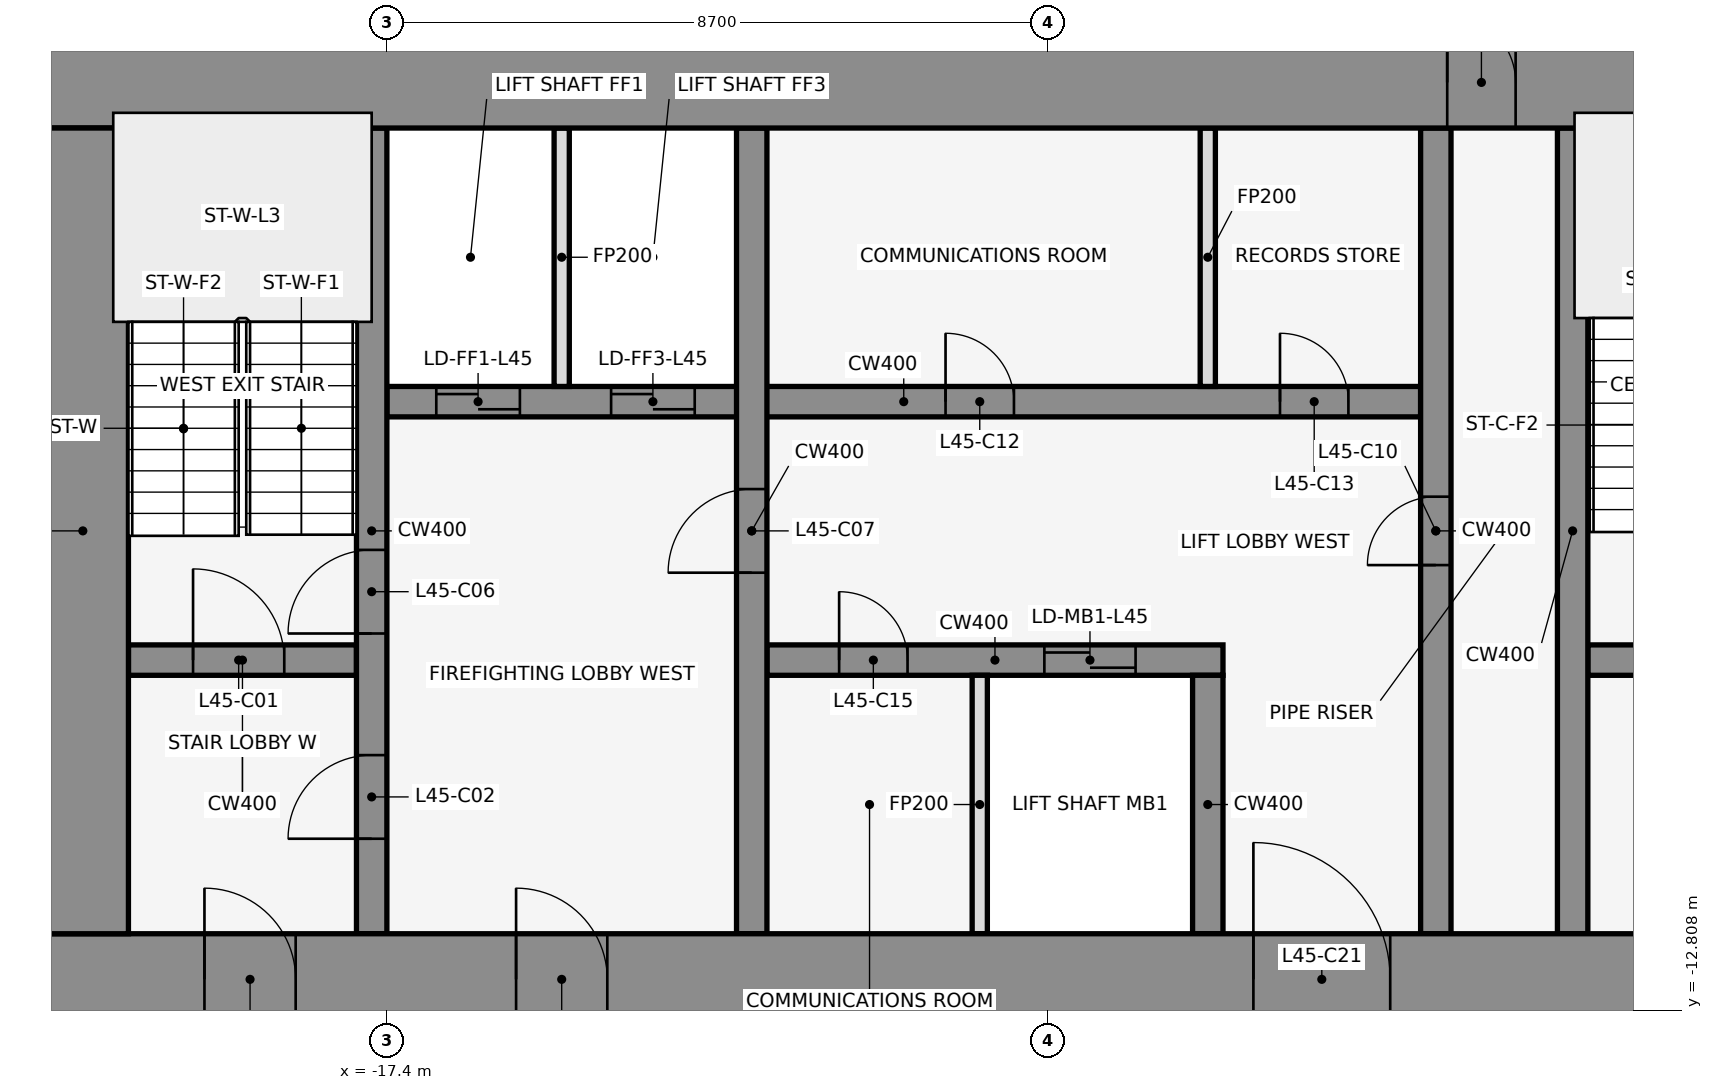
"""IFC4 building model, lengths in metres.
Left out: names, types, materials, properties, quantities, classifications, styles, units other than length and angle.
Written with IfcOpenShell. Run it as: python <this file> out.ifc"""

import sys

from ifc_helpers import new_model, si_unit, direction, frame, frame_2d, origin, place, context, subcontext, project, spatial, rectangle, extrude, element, fill, save


model = new_model("IFC4")
c1 = context("Model", 3, precision=1e-05, world=origin(), true_north=direction((0.0, 1.0)))
c2 = subcontext(c1, "Body", "Model", "MODEL_VIEW")
j1 = project(units=[si_unit("LENGTHUNIT", "METRE"), si_unit("PLANEANGLEUNIT", "RADIAN")], contexts=[c1])
p1 = place(None, origin())
s1 = spatial("IfcSite", under=j1, at=p1, CompositionType="ELEMENT")
p2 = place(p1, origin())
s2 = spatial("IfcBuilding", under=s1, at=p2, CompositionType="ELEMENT")
p3 = place(p2, frame((0.0, 0.0, 203.2)))
s3 = spatial("IfcBuildingStorey", under=s2, at=p3, CompositionType="ELEMENT", Elevation=203.2)
for number, where, z_axis, x_axis in (
    (1, (-0.068, -0.105, 0.0), (0.0, 0.0, 1.0), (-0.84, 0.543, 0.0)),
    (2, (-14.599, 1.08, 0.0), (0.0, 0.0, 1.0), (-0.84, -0.543, 0.0)),
):
    element("IfcWall", number, at=place(p3, frame(where, z_axis=z_axis, x_axis=x_axis)), inside=s3, PredefinedType="STANDARD", context=c2, shape_type="SweptSolid", body=[
        extrude(rectangle(XDim=2.183, YDim=0.25, at=frame_2d((1.091, 0.0))), origin(), (0.0, 0.0, 1.0), 3.95),
    ])
p4 = place(p3, frame((-20.8, -8.2, 0.0), z_axis=(0.0, 0.0, 1.0), x_axis=(1.0, 0.0, 0.0)))
e3 = element("IfcWall", 3, at=p4, inside=s3, PredefinedType="SHEAR", context=c2, shape_type="SweptSolid", body=[
    extrude(rectangle(XDim=3.0, YDim=0.4, at=frame_2d((1.5, 0.0))), origin(), (0.0, 0.0, 1.0), 4.1),
])
p5 = place(p4, frame((0.85, 0.0, 0.0)))
e4 = element("IfcOpeningElement", 4, at=p5, cuts=e3, PredefinedType="OPENING", context=c2, shape_type="SweptSolid", body=[
    extrude(rectangle(XDim=1.2, YDim=2.1, at=frame_2d((0.6, 1.05))), frame((0.0, 0.212, 0.0), z_axis=(0.0, -1.0, 0.0), x_axis=(1.0, 0.0, 0.0)), (0.0, 0.0, 1.0), 0.424),
])
p6 = place(p3, frame((-12.4, -8.2, 0.0), z_axis=(0.0, 0.0, 1.0), x_axis=(1.0, 0.0, 0.0)))
e5 = element("IfcWall", 5, at=p6, inside=s3, PredefinedType="SHEAR", context=c2, shape_type="SweptSolid", body=[
    extrude(rectangle(XDim=6.0, YDim=0.4, at=frame_2d((3.0, 0.0))), origin(), (0.0, 0.0, 1.0), 4.1),
])
p7 = place(p6, frame((3.65, 0.0, 0.0)))
e6 = element("IfcOpeningElement", 6, at=p7, cuts=e5, PredefinedType="OPENING", context=c2, shape_type="SweptSolid", body=[
    extrude(rectangle(XDim=1.2, YDim=2.1, at=frame_2d((0.6, 1.05))), frame((0.0, 0.212, 0.0), z_axis=(0.0, -1.0, 0.0), x_axis=(1.0, 0.0, 0.0)), (0.0, 0.0, 1.0), 0.424),
])
p8 = place(p6, frame((0.95, 0.0, 0.0)))
e7 = element("IfcOpeningElement", 7, at=p8, cuts=e5, PredefinedType="OPENING", context=c2, shape_type="SweptSolid", body=[
    extrude(rectangle(XDim=0.9, YDim=2.1, at=frame_2d((0.45, 1.05))), frame((0.0, 0.212, 0.0), z_axis=(0.0, -1.0, 0.0), x_axis=(1.0, 0.0, 0.0)), (0.0, 0.0, 1.0), 0.424),
])
p9 = place(p3, frame((-1.6, -8.2, 0.0), z_axis=(0.0, 0.0, 1.0), x_axis=(1.0, 0.0, 0.0)))
e8 = element("IfcWall", 8, at=p9, inside=s3, PredefinedType="SHEAR", context=c2, shape_type="SweptSolid", body=[
    extrude(rectangle(XDim=3.2, YDim=0.4, at=frame_2d((1.6, 0.0))), origin(), (0.0, 0.0, 1.0), 4.1),
])
p10 = place(p9, frame((1.05, 0.0, 0.0)))
e9 = element("IfcOpeningElement", 9, at=p10, cuts=e8, PredefinedType="OPENING", context=c2, shape_type="SweptSolid", body=[
    extrude(rectangle(XDim=1.2, YDim=2.1, at=frame_2d((0.6, 1.05))), frame((0.0, 0.212, 0.0), z_axis=(0.0, -1.0, 0.0), x_axis=(1.0, 0.0, 0.0)), (0.0, 0.0, 1.0), 0.424),
])
p11 = place(p3, frame((-17.4, -4.8, 0.0), z_axis=(0.0, 0.0, 1.0), x_axis=(1.0, 0.0, 0.0)))
e10 = element("IfcWall", 10, at=p11, inside=s3, PredefinedType="SHEAR", context=c2, shape_type="SweptSolid", body=[
    extrude(rectangle(XDim=13.6, YDim=0.4, at=frame_2d((6.8, 0.0))), origin(), (0.0, 0.0, 1.0), 4.1),
])
p12 = place(p11, frame((0.65, 0.0, 0.0)))
e11 = element("IfcOpeningElement", 11, at=p12, cuts=e10, PredefinedType="OPENING", context=c2, shape_type="SweptSolid", body=[
    extrude(rectangle(XDim=1.1, YDim=2.1, at=frame_2d((0.55, 1.05))), frame((0.0, 0.212, 0.0), z_axis=(0.0, -1.0, 0.0), x_axis=(1.0, 0.0, 0.0)), (0.0, 0.0, 1.0), 0.424),
])
p13 = place(p11, frame((2.95, 0.0, 0.0)))
e12 = element("IfcOpeningElement", 12, at=p13, cuts=e10, PredefinedType="OPENING", context=c2, shape_type="SweptSolid", body=[
    extrude(rectangle(XDim=1.1, YDim=2.1, at=frame_2d((0.55, 1.05))), frame((0.0, 0.212, 0.0), z_axis=(0.0, -1.0, 0.0), x_axis=(1.0, 0.0, 0.0)), (0.0, 0.0, 1.0), 0.424),
])
p14 = place(p11, frame((7.35, 0.0, 0.0)))
e13 = element("IfcOpeningElement", 13, at=p14, cuts=e10, PredefinedType="OPENING", context=c2, shape_type="SweptSolid", body=[
    extrude(rectangle(XDim=0.9, YDim=2.1, at=frame_2d((0.45, 1.05))), frame((0.0, 0.212, 0.0), z_axis=(0.0, -1.0, 0.0), x_axis=(1.0, 0.0, 0.0)), (0.0, 0.0, 1.0), 0.424),
])
p15 = place(p11, frame((11.75, 0.0, 0.0)))
e14 = element("IfcOpeningElement", 14, at=p15, cuts=e10, PredefinedType="OPENING", context=c2, shape_type="SweptSolid", body=[
    extrude(rectangle(XDim=0.9, YDim=2.1, at=frame_2d((0.45, 1.05))), frame((0.0, 0.212, 0.0), z_axis=(0.0, -1.0, 0.0), x_axis=(1.0, 0.0, 0.0)), (0.0, 0.0, 1.0), 0.424),
])
p16 = place(p3, frame((-17.6, -11.8, 0.0), z_axis=(0.0, 0.0, 1.0), x_axis=(0.0, 1.0, 0.0)))
e15 = element("IfcWall", 15, at=p16, inside=s3, PredefinedType="SHEAR", context=c2, shape_type="SweptSolid", body=[
    extrude(rectangle(XDim=10.6, YDim=0.4, at=frame_2d((5.3, 0.0))), origin(), (0.0, 0.0, 1.0), 4.1),
])
p17 = place(p16, frame((1.25, 0.0, 0.0)))
e16 = element("IfcOpeningElement", 16, at=p17, cuts=e15, PredefinedType="OPENING", context=c2, shape_type="SweptSolid", body=[
    extrude(rectangle(XDim=1.1, YDim=2.1, at=frame_2d((0.55, 1.05))), frame((0.0, 0.212, 0.0), z_axis=(0.0, -1.0, 0.0), x_axis=(1.0, 0.0, 0.0)), (0.0, 0.0, 1.0), 0.424),
])
p18 = place(p16, frame((3.95, 0.0, 0.0)))
e17 = element("IfcOpeningElement", 17, at=p18, cuts=e15, PredefinedType="OPENING", context=c2, shape_type="SweptSolid", body=[
    extrude(rectangle(XDim=1.1, YDim=2.1, at=frame_2d((0.55, 1.05))), frame((0.0, 0.212, 0.0), z_axis=(0.0, -1.0, 0.0), x_axis=(1.0, 0.0, 0.0)), (0.0, 0.0, 1.0), 0.424),
])
p19 = place(p3, frame((-15.1, -4.6, 0.0), z_axis=(0.0, 0.0, 1.0), x_axis=(0.0, 1.0, 0.0)))
e18 = element("IfcWall", 18, at=p19, inside=s3, PredefinedType="PARTITIONING", context=c2, shape_type="SweptSolid", body=[
    extrude(rectangle(XDim=3.4, YDim=0.2, at=frame_2d((1.7, 0.0))), origin(), (0.0, 0.0, 1.0), 2.84),
])
p20 = place(p3, frame((-12.6, -11.8, 0.0), z_axis=(0.0, 0.0, 1.0), x_axis=(0.0, 1.0, 0.0)))
e19 = element("IfcWall", 19, at=p20, inside=s3, PredefinedType="SHEAR", context=c2, shape_type="SweptSolid", body=[
    extrude(rectangle(XDim=10.6, YDim=0.4, at=frame_2d((5.3, 0.0))), origin(), (0.0, 0.0, 1.0), 4.1),
])
p21 = place(p20, frame((4.75, 0.0, 0.0)))
e20 = element("IfcOpeningElement", 20, at=p21, cuts=e19, PredefinedType="OPENING", context=c2, shape_type="SweptSolid", body=[
    extrude(rectangle(XDim=1.1, YDim=2.1, at=frame_2d((0.55, 1.05))), frame((0.0, 0.212, 0.0), z_axis=(0.0, -1.0, 0.0), x_axis=(1.0, 0.0, 0.0)), (0.0, 0.0, 1.0), 0.424),
])
p22 = place(p3, frame((-9.6, -11.8, 0.0), z_axis=(0.0, 0.0, 1.0), x_axis=(0.0, 1.0, 0.0)))
e21 = element("IfcWall", 21, at=p22, inside=s3, PredefinedType="PARTITIONING", context=c2, shape_type="SweptSolid", body=[
    extrude(rectangle(XDim=3.4, YDim=0.2, at=frame_2d((1.7, 0.0))), origin(), (0.0, 0.0, 1.0), 2.84),
])
p23 = place(p3, frame((-6.6, -11.8, 0.0), z_axis=(0.0, 0.0, 1.0), x_axis=(0.0, 1.0, 0.0)))
e22 = element("IfcWall", 22, at=p23, inside=s3, PredefinedType="SHEAR", context=c2, shape_type="SweptSolid", body=[
    extrude(rectangle(XDim=3.4, YDim=0.4, at=frame_2d((1.7, 0.0))), origin(), (0.0, 0.0, 1.0), 4.1),
])
p24 = place(p3, frame((-6.6, -4.6, 0.0), z_axis=(0.0, 0.0, 1.0), x_axis=(0.0, 1.0, 0.0)))
e23 = element("IfcWall", 23, at=p24, inside=s3, PredefinedType="PARTITIONING", context=c2, shape_type="SweptSolid", body=[
    extrude(rectangle(XDim=3.4, YDim=0.2, at=frame_2d((1.7, 0.0))), origin(), (0.0, 0.0, 1.0), 2.84),
])
p25 = place(p3, frame((-3.6, -11.8, 0.0), z_axis=(0.0, 0.0, 1.0), x_axis=(0.0, 1.0, 0.0)))
e24 = element("IfcWall", 24, at=p25, inside=s3, PredefinedType="SHEAR", context=c2, shape_type="SweptSolid", body=[
    extrude(rectangle(XDim=10.6, YDim=0.4, at=frame_2d((5.3, 0.0))), origin(), (0.0, 0.0, 1.0), 4.1),
])
p26 = place(p25, frame((4.85, 0.0, 0.0)))
e25 = element("IfcOpeningElement", 25, at=p26, cuts=e24, PredefinedType="OPENING", context=c2, shape_type="SweptSolid", body=[
    extrude(rectangle(XDim=0.9, YDim=2.1, at=frame_2d((0.45, 1.05))), frame((0.0, 0.212, 0.0), z_axis=(0.0, -1.0, 0.0), x_axis=(1.0, 0.0, 0.0)), (0.0, 0.0, 1.0), 0.424),
])
p27 = place(p3, frame((-1.8, -11.8, 0.0), z_axis=(0.0, 0.0, 1.0), x_axis=(0.0, 1.0, 0.0)))
e26 = element("IfcWall", 26, at=p27, inside=s3, PredefinedType="SHEAR", context=c2, shape_type="SweptSolid", body=[
    extrude(rectangle(XDim=10.6, YDim=0.4, at=frame_2d((5.3, 0.0))), origin(), (0.0, 0.0, 1.0), 4.1),
])
p28 = place(p3, frame((-22.0, -0.6, 0.0), z_axis=(0.0, 0.0, 1.0), x_axis=(1.0, 0.0, 0.0)))
e27 = element("IfcWall", 27, at=p28, inside=s3, PredefinedType="SHEAR", context=c2, shape_type="SweptSolid", body=[
    extrude(rectangle(XDim=44.0, YDim=1.2, at=frame_2d((22.0, 0.0))), origin(), (0.0, 0.0, 1.0), 4.1),
])
p29 = place(p28, frame((18.55, 0.0, 0.0)))
e28 = element("IfcOpeningElement", 28, at=p29, cuts=e27, PredefinedType="OPENING", context=c2, shape_type="SweptSolid", body=[
    extrude(rectangle(XDim=0.9, YDim=2.1, at=frame_2d((0.45, 1.05))), frame((0.0, 0.612, 0.0), z_axis=(0.0, -1.0, 0.0), x_axis=(1.0, 0.0, 0.0)), (0.0, 0.0, 1.0), 1.224),
])
p30 = place(p28, frame((24.55, 0.0, 0.0)))
e29 = element("IfcOpeningElement", 29, at=p30, cuts=e27, PredefinedType="OPENING", context=c2, shape_type="SweptSolid", body=[
    extrude(rectangle(XDim=0.9, YDim=2.1, at=frame_2d((0.45, 1.05))), frame((0.0, 0.612, 0.0), z_axis=(0.0, -1.0, 0.0), x_axis=(1.0, 0.0, 0.0)), (0.0, 0.0, 1.0), 1.224),
])
p31 = place(p3, frame((-22.0, -12.4, 0.0), z_axis=(0.0, 0.0, 1.0), x_axis=(1.0, 0.0, 0.0)))
e30 = element("IfcWall", 30, at=p31, inside=s3, PredefinedType="SHEAR", context=c2, shape_type="SweptSolid", body=[
    extrude(rectangle(XDim=44.0, YDim=1.2, at=frame_2d((22.0, 0.0))), origin(), (0.0, 0.0, 1.0), 4.1),
])
p32 = place(p31, frame((2.2, 0.0, 0.0)))
e31 = element("IfcOpeningElement", 31, at=p32, cuts=e30, PredefinedType="OPENING", context=c2, shape_type="SweptSolid", body=[
    extrude(rectangle(XDim=1.2, YDim=2.1, at=frame_2d((0.6, 1.05))), frame((0.0, 0.612, 0.0), z_axis=(0.0, -1.0, 0.0), x_axis=(1.0, 0.0, 0.0)), (0.0, 0.0, 1.0), 1.224),
])
p33 = place(p31, frame((21.4, 0.0, 0.0)))
e32 = element("IfcOpeningElement", 32, at=p33, cuts=e30, PredefinedType="OPENING", context=c2, shape_type="SweptSolid", body=[
    extrude(rectangle(XDim=1.2, YDim=2.1, at=frame_2d((0.6, 1.05))), frame((0.0, 0.612, 0.0), z_axis=(0.0, -1.0, 0.0), x_axis=(1.0, 0.0, 0.0)), (0.0, 0.0, 1.0), 1.224),
])
p34 = place(p31, frame((40.6, 0.0, 0.0)))
e33 = element("IfcOpeningElement", 33, at=p34, cuts=e30, PredefinedType="OPENING", context=c2, shape_type="SweptSolid", body=[
    extrude(rectangle(XDim=1.2, YDim=2.1, at=frame_2d((0.6, 1.05))), frame((0.0, 0.612, 0.0), z_axis=(0.0, -1.0, 0.0), x_axis=(1.0, 0.0, 0.0)), (0.0, 0.0, 1.0), 1.224),
])
p35 = place(p31, frame((16.0, 0.0, 0.0)))
e34 = element("IfcOpeningElement", 34, at=p35, cuts=e30, PredefinedType="OPENING", context=c2, shape_type="SweptSolid", body=[
    extrude(rectangle(XDim=1.8, YDim=2.1, at=frame_2d((0.9, 1.05))), frame((0.0, 0.612, 0.0), z_axis=(0.0, -1.0, 0.0), x_axis=(1.0, 0.0, 0.0)), (0.0, 0.0, 1.0), 1.224),
])
p36 = place(p31, frame((6.3, 0.0, 0.0)))
e35 = element("IfcOpeningElement", 35, at=p36, cuts=e30, PredefinedType="OPENING", context=c2, shape_type="SweptSolid", body=[
    extrude(rectangle(XDim=1.2, YDim=2.1, at=frame_2d((0.6, 1.05))), frame((0.0, 0.612, 0.0), z_axis=(0.0, -1.0, 0.0), x_axis=(1.0, 0.0, 0.0)), (0.0, 0.0, 1.0), 1.224),
])
p37 = place(p31, frame((26.2, 0.0, 0.0)))
e36 = element("IfcOpeningElement", 36, at=p37, cuts=e30, PredefinedType="OPENING", context=c2, shape_type="SweptSolid", body=[
    extrude(rectangle(XDim=1.8, YDim=2.1, at=frame_2d((0.9, 1.05))), frame((0.0, 0.612, 0.0), z_axis=(0.0, -1.0, 0.0), x_axis=(1.0, 0.0, 0.0)), (0.0, 0.0, 1.0), 1.224),
])
p38 = place(p31, frame((36.5, 0.0, 0.0)))
e37 = element("IfcOpeningElement", 37, at=p38, cuts=e30, PredefinedType="OPENING", context=c2, shape_type="SweptSolid", body=[
    extrude(rectangle(XDim=1.2, YDim=2.1, at=frame_2d((0.6, 1.05))), frame((0.0, 0.612, 0.0), z_axis=(0.0, -1.0, 0.0), x_axis=(1.0, 0.0, 0.0)), (0.0, 0.0, 1.0), 1.224),
])
p39 = place(p3, frame((-21.4, -11.8, 0.0), z_axis=(0.0, 0.0, 1.0), x_axis=(0.0, 1.0, 0.0)))
e38 = element("IfcWall", 38, at=p39, inside=s3, PredefinedType="SHEAR", context=c2, shape_type="SweptSolid", body=[
    extrude(rectangle(XDim=10.6, YDim=1.2, at=frame_2d((5.3, 0.0))), origin(), (0.0, 0.0, 1.0), 4.1),
])
p40 = place(p5, origin())
e39 = element("IfcDoor", 39, at=p40, inside=s3, OperationType="SINGLE_SWING_LEFT", PredefinedType="DOOR", context=c2, shape_type="SweptSolid", body=[
    extrude(rectangle(XDim=1.2, YDim=2.1, at=frame_2d((0.6, 1.05))), frame((0.0, 0.025, 0.0), z_axis=(0.0, -1.0, 0.0), x_axis=(1.0, 0.0, 0.0)), (0.0, 0.0, 1.0), 0.05),
])
fill(e4, e39)
p41 = place(p17, frame((1.1, 0.0, 0.0), z_axis=(0.0, 0.0, 1.0), x_axis=(-1.0, 0.0, 0.0)))
e40 = element("IfcDoor", 40, at=p41, inside=s3, OperationType="SINGLE_SWING_LEFT", PredefinedType="DOOR", context=c2, shape_type="SweptSolid", body=[
    extrude(rectangle(XDim=1.1, YDim=2.1, at=frame_2d((0.55, 1.05))), frame((0.0, 0.025, 0.0), z_axis=(0.0, -1.0, 0.0), x_axis=(1.0, 0.0, 0.0)), (0.0, 0.0, 1.0), 0.05),
])
fill(e16, e40)
p42 = place(p12, origin())
e41 = element("IfcDoor", 41, at=p42, inside=s3, OperationType="DOUBLE_DOOR_SLIDING", PredefinedType="DOOR", context=c2, shape_type="SweptSolid", body=[
    extrude(rectangle(XDim=1.1, YDim=2.1, at=frame_2d((0.55, 1.05))), frame((0.0, 0.025, 0.0), z_axis=(0.0, -1.0, 0.0), x_axis=(1.0, 0.0, 0.0)), (0.0, 0.0, 1.0), 0.05),
])
fill(e11, e41)
p43 = place(p13, origin())
e42 = element("IfcDoor", 42, at=p43, inside=s3, OperationType="DOUBLE_DOOR_SLIDING", PredefinedType="DOOR", context=c2, shape_type="SweptSolid", body=[
    extrude(rectangle(XDim=1.1, YDim=2.1, at=frame_2d((0.55, 1.05))), frame((0.0, 0.025, 0.0), z_axis=(0.0, -1.0, 0.0), x_axis=(1.0, 0.0, 0.0)), (0.0, 0.0, 1.0), 0.05),
])
fill(e12, e42)
p44 = place(p7, origin())
e43 = element("IfcDoor", 43, at=p44, inside=s3, OperationType="DOUBLE_DOOR_SLIDING", PredefinedType="DOOR", context=c2, shape_type="SweptSolid", body=[
    extrude(rectangle(XDim=1.2, YDim=2.1, at=frame_2d((0.6, 1.05))), frame((0.0, 0.025, 0.0), z_axis=(0.0, -1.0, 0.0), x_axis=(1.0, 0.0, 0.0)), (0.0, 0.0, 1.0), 0.05),
])
fill(e6, e43)
p45 = place(p18, frame((1.1, 0.0, 0.0), z_axis=(0.0, 0.0, 1.0), x_axis=(-1.0, 0.0, 0.0)))
e44 = element("IfcDoor", 44, at=p45, inside=s3, OperationType="SINGLE_SWING_LEFT", PredefinedType="DOOR", context=c2, shape_type="SweptSolid", body=[
    extrude(rectangle(XDim=1.1, YDim=2.1, at=frame_2d((0.55, 1.05))), frame((0.0, 0.025, 0.0), z_axis=(0.0, -1.0, 0.0), x_axis=(1.0, 0.0, 0.0)), (0.0, 0.0, 1.0), 0.05),
])
fill(e17, e44)
p46 = place(p21, origin())
e45 = element("IfcDoor", 45, at=p46, inside=s3, OperationType="SINGLE_SWING_LEFT", PredefinedType="DOOR", context=c2, shape_type="SweptSolid", body=[
    extrude(rectangle(XDim=1.1, YDim=2.1, at=frame_2d((0.55, 1.05))), frame((0.0, 0.025, 0.0), z_axis=(0.0, -1.0, 0.0), x_axis=(1.0, 0.0, 0.0)), (0.0, 0.0, 1.0), 0.05),
])
fill(e20, e45)
p47 = place(p26, frame((0.9, 0.0, 0.0), z_axis=(0.0, 0.0, 1.0), x_axis=(-1.0, 0.0, 0.0)))
e46 = element("IfcDoor", 46, at=p47, inside=s3, OperationType="SINGLE_SWING_LEFT", PredefinedType="DOOR", context=c2, shape_type="SweptSolid", body=[
    extrude(rectangle(XDim=0.9, YDim=2.1, at=frame_2d((0.45, 1.05))), frame((0.0, 0.025, 0.0), z_axis=(0.0, -1.0, 0.0), x_axis=(1.0, 0.0, 0.0)), (0.0, 0.0, 1.0), 0.05),
])
fill(e25, e46)
p48 = place(p14, origin())
e47 = element("IfcDoor", 47, at=p48, inside=s3, OperationType="SINGLE_SWING_RIGHT", PredefinedType="DOOR", context=c2, shape_type="SweptSolid", body=[
    extrude(rectangle(XDim=0.9, YDim=2.1, at=frame_2d((0.45, 1.05))), frame((0.0, 0.025, 0.0), z_axis=(0.0, -1.0, 0.0), x_axis=(1.0, 0.0, 0.0)), (0.0, 0.0, 1.0), 0.05),
])
fill(e13, e47)
p49 = place(p15, origin())
e48 = element("IfcDoor", 48, at=p49, inside=s3, OperationType="SINGLE_SWING_LEFT", PredefinedType="DOOR", context=c2, shape_type="SweptSolid", body=[
    extrude(rectangle(XDim=0.9, YDim=2.1, at=frame_2d((0.45, 1.05))), frame((0.0, 0.025, 0.0), z_axis=(0.0, -1.0, 0.0), x_axis=(1.0, 0.0, 0.0)), (0.0, 0.0, 1.0), 0.05),
])
fill(e14, e48)
p50 = place(p8, frame((0.9, 0.0, 0.0), z_axis=(0.0, 0.0, 1.0), x_axis=(-1.0, 0.0, 0.0)))
e49 = element("IfcDoor", 49, at=p50, inside=s3, OperationType="SINGLE_SWING_RIGHT", PredefinedType="DOOR", context=c2, shape_type="SweptSolid", body=[
    extrude(rectangle(XDim=0.9, YDim=2.1, at=frame_2d((0.45, 1.05))), frame((0.0, 0.025, 0.0), z_axis=(0.0, -1.0, 0.0), x_axis=(1.0, 0.0, 0.0)), (0.0, 0.0, 1.0), 0.05),
])
fill(e7, e49)
p51 = place(p29, origin())
e50 = element("IfcDoor", 50, at=p51, inside=s3, OperationType="SINGLE_SWING_LEFT", PredefinedType="DOOR", context=c2, shape_type="SweptSolid", body=[
    extrude(rectangle(XDim=0.9, YDim=2.1, at=frame_2d((0.45, 1.05))), frame((0.0, 0.025, 0.0), z_axis=(0.0, -1.0, 0.0), x_axis=(1.0, 0.0, 0.0)), (0.0, 0.0, 1.0), 0.05),
])
fill(e28, e50)
p52 = place(p32, frame((1.2, 0.0, 0.0), z_axis=(0.0, 0.0, 1.0), x_axis=(-1.0, 0.0, 0.0)))
e51 = element("IfcDoor", 51, at=p52, inside=s3, OperationType="SINGLE_SWING_RIGHT", PredefinedType="DOOR", context=c2, shape_type="SweptSolid", body=[
    extrude(rectangle(XDim=1.2, YDim=2.1, at=frame_2d((0.6, 1.05))), frame((0.0, 0.025, 0.0), z_axis=(0.0, -1.0, 0.0), x_axis=(1.0, 0.0, 0.0)), (0.0, 0.0, 1.0), 0.05),
])
fill(e31, e51)
p53 = place(p35, origin())
e52 = element("IfcDoor", 52, at=p53, inside=s3, OperationType="SINGLE_SWING_LEFT", PredefinedType="DOOR", context=c2, shape_type="SweptSolid", body=[
    extrude(rectangle(XDim=1.8, YDim=2.1, at=frame_2d((0.9, 1.05))), frame((0.0, 0.025, 0.0), z_axis=(0.0, -1.0, 0.0), x_axis=(1.0, 0.0, 0.0)), (0.0, 0.0, 1.0), 0.05),
])
fill(e34, e52)
p54 = place(p36, frame((1.2, 0.0, 0.0), z_axis=(0.0, 0.0, 1.0), x_axis=(-1.0, 0.0, 0.0)))
e53 = element("IfcDoor", 53, at=p54, inside=s3, OperationType="SINGLE_SWING_RIGHT", PredefinedType="DOOR", context=c2, shape_type="SweptSolid", body=[
    extrude(rectangle(XDim=1.2, YDim=2.1, at=frame_2d((0.6, 1.05))), frame((0.0, 0.025, 0.0), z_axis=(0.0, -1.0, 0.0), x_axis=(1.0, 0.0, 0.0)), (0.0, 0.0, 1.0), 0.05),
])
fill(e35, e53)
save(model, sys.argv[1])
